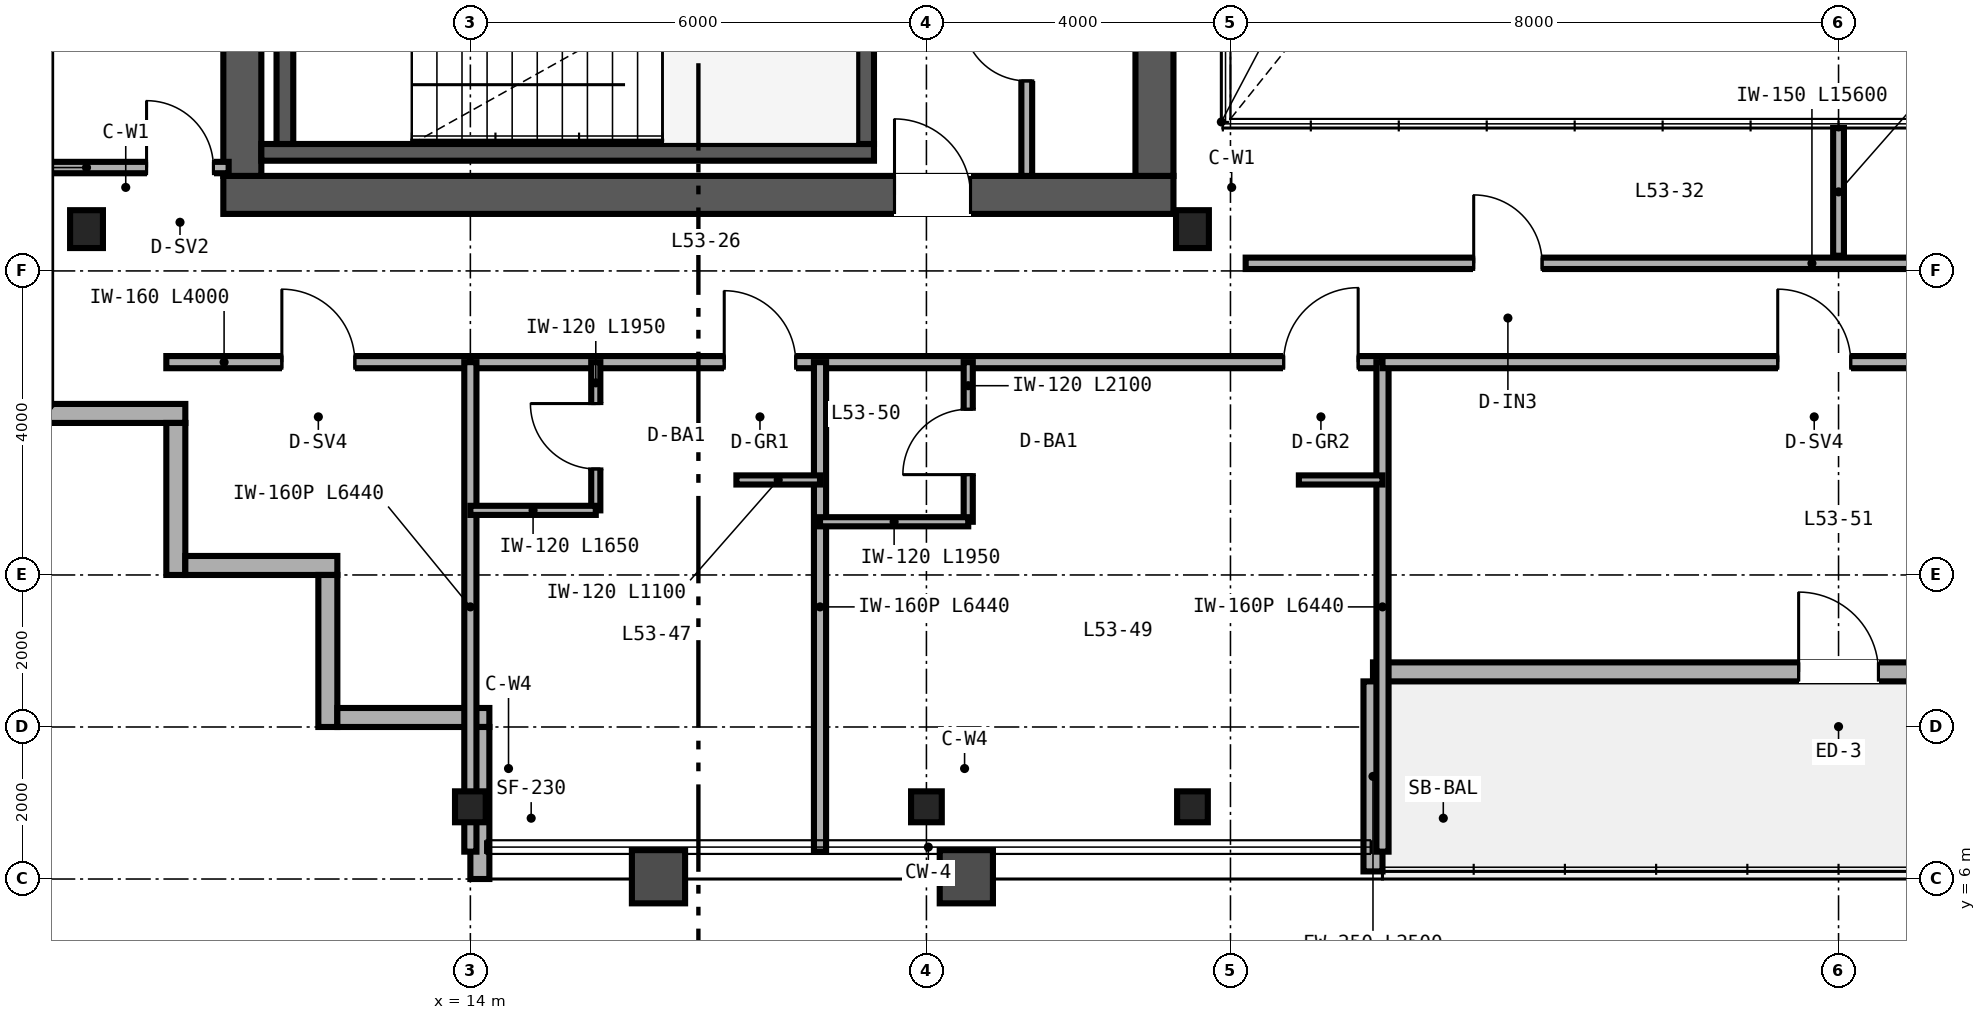
"""IFC4 building model, lengths in metres.
Left out: names, types, materials, properties, quantities, classifications, styles, units other than length and angle.
Written with IfcOpenShell. Run it as: python <this file> out.ifc"""

import sys

from ifc_helpers import new_model, si_unit, direction, frame, frame_2d, origin, origin_2d, place, context, subcontext, project, spatial, rectangle, i_section, extrude, source, transform, mapped, element, fill, save


model = new_model("IFC4")
c1 = context("Model", 3, precision=1e-05, world=origin(), true_north=direction((0.0, 1.0)))
c2 = subcontext(c1, "Body", "Model", "MODEL_VIEW")
j1 = project(units=[si_unit("LENGTHUNIT", "METRE"), si_unit("PLANEANGLEUNIT", "RADIAN")], contexts=[c1])
p1 = place(None, origin())
s1 = spatial("IfcSite", under=j1, at=p1, CompositionType="ELEMENT")
p2 = place(p1, origin())
s2 = spatial("IfcBuilding", under=s1, at=p2, CompositionType="ELEMENT")
p3 = place(p2, frame((0.0, 0.0, 210.0)))
s3 = spatial("IfcBuildingStorey", under=s2, at=p3, CompositionType="ELEMENT", Elevation=210.0)
p4 = place(p3, frame((10.75, 15.0, 0.0), z_axis=(0.0, 0.0, 1.0), x_axis=(1.0, 0.0, 0.0)))
e1 = element("IfcWall", 1, at=p4, inside=s3, PredefinedType="SHEAR", context=c2, shape_type="SweptSolid", body=[
    extrude(rectangle(XDim=12.5, YDim=0.5, at=frame_2d((6.25, 0.0))), origin(), (0.0, 0.0, 1.0), 3.37),
])
p5 = place(p4, frame((8.83, 0.0, 0.0)))
e2 = element("IfcOpeningElement", 2, at=p5, cuts=e1, PredefinedType="OPENING", context=c2, shape_type="SweptSolid", body=[
    extrude(rectangle(XDim=1.0, YDim=2.15, at=frame_2d((0.5, 1.075))), frame((0.0, 0.26, 0.0), z_axis=(0.0, -1.0, 0.0), x_axis=(1.0, 0.0, 0.0)), (0.0, 0.0, 1.0), 0.52),
])
for number, where, z_axis, x_axis in (
    (3, (11.0, 15.25, 0.0), (0.0, 0.0, 1.0), (0.0, 1.0, 0.0)),
    (4, (23.0, 15.25, 0.0), (0.0, 0.0, 1.0), (0.0, 1.0, 0.0)),
):
    element("IfcWall", number, at=place(p3, frame(where, z_axis=z_axis, x_axis=x_axis)), inside=s3, PredefinedType="SHEAR", context=c2, shape_type="SweptSolid", body=[
        extrude(rectangle(XDim=21.5, YDim=0.5, at=frame_2d((10.75, 0.0))), origin(), (0.0, 0.0, 1.0), 3.37),
    ])
p6 = place(p3, frame((11.25, 15.56, 0.0), z_axis=(0.0, 0.0, 1.0), x_axis=(1.0, 0.0, 0.0)))
e5 = element("IfcWall", 5, at=p6, inside=s3, PredefinedType="SHEAR", context=c2, shape_type="SweptSolid", body=[
    extrude(rectangle(XDim=8.06, YDim=0.22, at=frame_2d((4.03, 0.0))), origin(), (0.0, 0.0, 1.0), 3.4),
])
for number, where, z_axis, x_axis in (
    (6, (11.56, 15.67, 0.0), (0.0, 0.0, 1.0), (0.0, 1.0, 0.0)),
    (7, (19.2, 15.67, 0.0), (0.0, 0.0, 1.0), (0.0, 1.0, 0.0)),
):
    element("IfcWall", number, at=place(p3, frame(where, z_axis=z_axis, x_axis=x_axis)), inside=s3, PredefinedType="SHEAR", context=c2, shape_type="SweptSolid", body=[
        extrude(rectangle(XDim=3.28, YDim=0.22, at=frame_2d((1.64, 0.0))), origin(), (0.0, 0.0, 1.0), 3.4),
    ])
m1 = source(origin(), c2, "Body", "SweptSolid", [
    extrude(i_section(OverallWidth=0.432, OverallDepth=0.498, WebThickness=0.056, FlangeThickness=0.089, FilletRadius=0.025, at=origin_2d()), origin(), (0.0, 0.0, 1.0), 3.37),
])
for number, where, z_axis, x_axis in (
    (8, (8.95, 14.55, 0.0), (0.0, 0.0, 1.0), (1.0, 0.0, 0.0)),
    (9, (23.5, 14.55, 0.0), (0.0, 0.0, 1.0), (1.0, 0.0, 0.0)),
):
    element("IfcColumn", number, at=place(p3, frame(where, z_axis=z_axis, x_axis=x_axis)), inside=s3, PredefinedType="COLUMN", context=c2, shape_type="MappedRepresentation", body=[
        mapped(m1, transform((0.0, 0.0, 0.0), scale=1.0)),
    ])
m2 = source(origin(), c2, "Body", "SweptSolid", [
    extrude(i_section(OverallWidth=0.404, OverallDepth=0.407, WebThickness=0.027, FlangeThickness=0.044, FilletRadius=0.025, at=origin_2d()), origin(), (0.0, 0.0, 1.0), 3.37),
])
for number, where, z_axis, x_axis in (
    (10, (14.0, 6.95, 0.0), (0.0, 0.0, 1.0), (1.0, 0.0, 0.0)),
    (11, (20.0, 6.95, 0.0), (0.0, 0.0, 1.0), (1.0, 0.0, 0.0)),
    (12, (23.5, 6.95, 0.0), (0.0, 0.0, 1.0), (1.0, 0.0, 0.0)),
):
    element("IfcColumn", number, at=place(p3, frame(where, z_axis=z_axis, x_axis=x_axis)), inside=s3, PredefinedType="COLUMN", context=c2, shape_type="MappedRepresentation", body=[
        mapped(m2, transform((0.0, 0.0, 0.0), scale=1.0)),
    ])
p7 = place(p3, frame((8.0, 12.125, 0.0), z_axis=(0.0, 0.0, 1.0), x_axis=(1.0, 0.0, 0.0)))
e13 = element("IfcWall", 13, at=p7, inside=s3, PredefinedType="SOLIDWALL", context=c2, shape_type="SweptSolid", body=[
    extrude(rectangle(XDim=2.25, YDim=0.25, at=frame_2d((1.125, 0.0))), origin(), (0.0, 0.0, 1.0), 3.37),
])
for number, where, z_axis, x_axis in (
    (14, (10.125, 12.0, 0.0), (0.0, 0.0, 1.0), (0.0, -1.0, 0.0)),
    (15, (10.25, 10.125, 0.0), (0.0, 0.0, 1.0), (1.0, 0.0, 0.0)),
    (16, (12.125, 10.0, 0.0), (0.0, 0.0, 1.0), (0.0, -1.0, 0.0)),
    (17, (12.25, 8.125, 0.0), (0.0, 0.0, 1.0), (1.0, 0.0, 0.0)),
):
    element("IfcWall", number, at=place(p3, frame(where, z_axis=z_axis, x_axis=x_axis)), inside=s3, PredefinedType="SOLIDWALL", context=c2, shape_type="SweptSolid", body=[
        extrude(rectangle(XDim=2.0, YDim=0.25, at=frame_2d((1.0, 0.0))), origin(), (0.0, 0.0, 1.0), 3.37),
    ])
p8 = place(p3, frame((14.125, 8.0, 0.0), z_axis=(0.0, 0.0, 1.0), x_axis=(0.0, -1.0, 0.0)))
e18 = element("IfcWall", 18, at=p8, inside=s3, PredefinedType="SOLIDWALL", context=c2, shape_type="SweptSolid", body=[
    extrude(rectangle(XDim=2.0, YDim=0.25, at=frame_2d((1.0, 0.0))), origin(), (0.0, 0.0, 1.0), 2.677),
])
p9 = place(p3, frame((25.875, 8.725, 0.0), z_axis=(0.0, 0.0, 1.0), x_axis=(1.0, 0.0, 0.0)))
e19 = element("IfcWall", 19, at=p9, inside=s3, PredefinedType="SOLIDWALL", context=c2, shape_type="SweptSolid", body=[
    extrude(rectangle(XDim=12.25, YDim=0.25, at=frame_2d((6.125, 0.0))), origin(), (0.0, 0.0, 1.0), 3.37),
])
p10 = place(p9, frame((5.6, 0.0, 0.0)))
e20 = element("IfcOpeningElement", 20, at=p10, cuts=e19, PredefinedType="OPENING", context=c2, shape_type="SweptSolid", body=[
    extrude(rectangle(XDim=1.05, YDim=2.15, at=frame_2d((0.525, 1.075))), frame((0.0, 0.135, 0.0), z_axis=(0.0, -1.0, 0.0), x_axis=(1.0, 0.0, 0.0)), (0.0, 0.0, 1.0), 0.27),
])
p11 = place(p3, frame((25.875, 6.1, 0.0), z_axis=(0.0, 0.0, 1.0), x_axis=(0.0, 1.0, 0.0)))
e21 = element("IfcWall", 21, at=p11, inside=s3, PredefinedType="SOLIDWALL", context=c2, shape_type="SweptSolid", body=[
    extrude(rectangle(XDim=2.5, YDim=0.25, at=frame_2d((1.25, 0.0))), origin(), (0.0, 0.0, 1.0), 2.443),
])
p12 = place(p3, frame((21.32, 15.25, 0.0), z_axis=(0.0, 0.0, 1.0), x_axis=(0.0, 1.0, 0.0)))
e22 = element("IfcWall", 22, at=p12, inside=s3, PredefinedType="PARTITIONING", context=c2, shape_type="SweptSolid", body=[
    extrude(rectangle(XDim=3.59, YDim=0.142, at=frame_2d((1.795, 0.0))), origin(), (0.0, 0.0, 1.0), 3.37),
])
p13 = place(p12, frame((1.25, 0.0, 0.0)))
e23 = element("IfcOpeningElement", 23, at=p13, cuts=e22, PredefinedType="OPENING", context=c2, shape_type="SweptSolid", body=[
    extrude(rectangle(XDim=0.84, YDim=2.1, at=frame_2d((0.42, 1.05))), frame((0.0, 0.081, 0.0), z_axis=(0.0, -1.0, 0.0), x_axis=(1.0, 0.0, 0.0)), (0.0, 0.0, 1.0), 0.162),
])
p14 = place(p3, frame((24.2, 14.1, 0.0), z_axis=(0.0, 0.0, 1.0), x_axis=(1.0, 0.0, 0.0)))
e24 = element("IfcWall", 24, at=p14, inside=s3, PredefinedType="PARTITIONING", context=c2, shape_type="SweptSolid", body=[
    extrude(rectangle(XDim=15.6, YDim=0.15, at=frame_2d((7.8, 0.0))), origin(), (0.0, 0.0, 1.0), 3.37),
])
p15 = place(p14, frame((3.0, 0.0, 0.0)))
e25 = element("IfcOpeningElement", 25, at=p15, cuts=e24, PredefinedType="OPENING", context=c2, shape_type="SweptSolid", body=[
    extrude(rectangle(XDim=0.9, YDim=2.15, at=frame_2d((0.45, 1.075))), frame((0.0, 0.085, 0.0), z_axis=(0.0, -1.0, 0.0), x_axis=(1.0, 0.0, 0.0)), (0.0, 0.0, 1.0), 0.17),
])
p16 = place(p14, frame((11.0, 0.0, 0.0)))
e26 = element("IfcOpeningElement", 26, at=p16, cuts=e24, PredefinedType="OPENING", context=c2, shape_type="SweptSolid", body=[
    extrude(rectangle(XDim=0.9, YDim=2.15, at=frame_2d((0.45, 1.075))), frame((0.0, 0.085, 0.0), z_axis=(0.0, -1.0, 0.0), x_axis=(1.0, 0.0, 0.0)), (0.0, 0.0, 1.0), 0.17),
])
p17 = place(p3, frame((32.0, 14.2, 0.0), z_axis=(0.0, 0.0, 1.0), x_axis=(0.0, 1.0, 0.0)))
e27 = element("IfcWall", 27, at=p17, inside=s3, PredefinedType="PARTITIONING", context=c2, shape_type="SweptSolid", body=[
    extrude(rectangle(XDim=1.68, YDim=0.142, at=frame_2d((0.84, 0.0))), origin(), (0.0, 0.0, 1.0), 3.37),
])
p18 = place(p3, frame((8.16, 15.36, 0.0), z_axis=(0.0, 0.0, 1.0), x_axis=(1.0, 0.0, 0.0)))
e28 = element("IfcWall", 28, at=p18, inside=s3, PredefinedType="PARTITIONING", context=c2, shape_type="SweptSolid", body=[
    extrude(rectangle(XDim=2.66, YDim=0.15, at=frame_2d((1.33, 0.0))), origin(), (0.0, 0.0, 1.0), 2.591),
])
p19 = place(p18, frame((1.58, 0.0, 0.0)))
e29 = element("IfcOpeningElement", 29, at=p19, cuts=e28, PredefinedType="OPENING", context=c2, shape_type="SweptSolid", body=[
    extrude(rectangle(XDim=0.88, YDim=2.15, at=frame_2d((0.44, 1.075))), frame((0.0, 0.085, 0.0), z_axis=(0.0, -1.0, 0.0), x_axis=(1.0, 0.0, 0.0)), (0.0, 0.0, 1.0), 0.17),
])
p20 = place(p3, frame((10.0, 12.8, 0.0), z_axis=(0.0, 0.0, 1.0), x_axis=(1.0, 0.0, 0.0)))
e30 = element("IfcWall", 30, at=p20, inside=s3, PredefinedType="PARTITIONING", context=c2, shape_type="SweptSolid", body=[
    extrude(rectangle(XDim=4.0, YDim=0.16, at=frame_2d((2.0, 0.0))), origin(), (0.0, 0.0, 1.0), 3.37),
])
p21 = place(p20, frame((1.52, 0.0, 0.0)))
e31 = element("IfcOpeningElement", 31, at=p21, cuts=e30, PredefinedType="OPENING", context=c2, shape_type="SweptSolid", body=[
    extrude(rectangle(XDim=0.96, YDim=2.15, at=frame_2d((0.48, 1.075))), frame((0.0, 0.09, 0.0), z_axis=(0.0, -1.0, 0.0), x_axis=(1.0, 0.0, 0.0)), (0.0, 0.0, 1.0), 0.18),
])
p22 = place(p3, frame((14.0, 12.8, 0.0), z_axis=(0.0, 0.0, 1.0), x_axis=(1.0, 0.0, 0.0)))
e32 = element("IfcWall", 32, at=p22, inside=s3, PredefinedType="PARTITIONING", context=c2, shape_type="SweptSolid", body=[
    extrude(rectangle(XDim=12.0, YDim=0.16, at=frame_2d((6.0, 0.0))), origin(), (0.0, 0.0, 1.0), 2.913),
])
p23 = place(p22, frame((3.34, 0.0, 0.0)))
e33 = element("IfcOpeningElement", 33, at=p23, cuts=e32, PredefinedType="OPENING", context=c2, shape_type="SweptSolid", body=[
    extrude(rectangle(XDim=0.94, YDim=2.15, at=frame_2d((0.47, 1.075))), frame((0.0, 0.09, 0.0), z_axis=(0.0, -1.0, 0.0), x_axis=(1.0, 0.0, 0.0)), (0.0, 0.0, 1.0), 0.18),
])
p24 = place(p22, frame((10.7, 0.0, 0.0)))
e34 = element("IfcOpeningElement", 34, at=p24, cuts=e32, PredefinedType="OPENING", context=c2, shape_type="SweptSolid", body=[
    extrude(rectangle(XDim=0.98, YDim=2.2, at=frame_2d((0.49, 1.1))), frame((0.0, 0.09, 0.0), z_axis=(0.0, -1.0, 0.0), x_axis=(1.0, 0.0, 0.0)), (0.0, 0.0, 1.0), 0.18),
])
p25 = place(p3, frame((14.0, 6.36, 0.0), z_axis=(0.0, 0.0, 1.0), x_axis=(0.0, 1.0, 0.0)))
e35 = element("IfcWall", 35, at=p25, inside=s3, PredefinedType="PARTITIONING", context=c2, shape_type="SweptSolid", body=[
    extrude(rectangle(XDim=6.44, YDim=0.16, at=frame_2d((3.22, 0.0))), origin(), (0.0, 0.0, 1.0), 2.677),
])
p26 = place(p3, frame((26.0, 6.36, 0.0), z_axis=(0.0, 0.0, 1.0), x_axis=(0.0, 1.0, 0.0)))
e36 = element("IfcWall", 36, at=p26, inside=s3, PredefinedType="PARTITIONING", context=c2, shape_type="SweptSolid", body=[
    extrude(rectangle(XDim=6.44, YDim=0.16, at=frame_2d((3.22, 0.0))), origin(), (0.0, 0.0, 1.0), 2.443),
])
p27 = place(p3, frame((18.6, 6.36, 0.0), z_axis=(0.0, 0.0, 1.0), x_axis=(0.0, 1.0, 0.0)))
e37 = element("IfcWall", 37, at=p27, inside=s3, PredefinedType="PARTITIONING", context=c2, shape_type="SweptSolid", body=[
    extrude(rectangle(XDim=6.44, YDim=0.16, at=frame_2d((3.22, 0.0))), origin(), (0.0, 0.0, 1.0), 2.677),
])
p28 = place(p3, frame((15.65, 10.85, 0.0), z_axis=(0.0, 0.0, 1.0), x_axis=(0.0, 1.0, 0.0)))
e38 = element("IfcWall", 38, at=p28, inside=s3, PredefinedType="PARTITIONING", context=c2, shape_type="SweptSolid", body=[
    extrude(rectangle(XDim=1.95, YDim=0.12, at=frame_2d((0.975, 0.0))), origin(), (0.0, 0.0, 1.0), 3.37),
])
p29 = place(p28, frame((0.545, 0.0, 0.0)))
e39 = element("IfcOpeningElement", 39, at=p29, cuts=e38, PredefinedType="OPENING", context=c2, shape_type="SweptSolid", body=[
    extrude(rectangle(XDim=0.86, YDim=2.1, at=frame_2d((0.43, 1.05))), frame((0.0, 0.07, 0.0), z_axis=(0.0, -1.0, 0.0), x_axis=(1.0, 0.0, 0.0)), (0.0, 0.0, 1.0), 0.14),
])
p30 = place(p3, frame((14.0, 10.85, 0.0), z_axis=(0.0, 0.0, 1.0), x_axis=(1.0, 0.0, 0.0)))
e40 = element("IfcWall", 40, at=p30, inside=s3, PredefinedType="PARTITIONING", context=c2, shape_type="SweptSolid", body=[
    extrude(rectangle(XDim=1.65, YDim=0.12, at=frame_2d((0.825, 0.0))), origin(), (0.0, 0.0, 1.0), 3.37),
])
p31 = place(p3, frame((17.5, 11.25, 0.0), z_axis=(0.0, 0.0, 1.0), x_axis=(1.0, 0.0, 0.0)))
e41 = element("IfcWall", 41, at=p31, inside=s3, PredefinedType="PARTITIONING", context=c2, shape_type="SweptSolid", body=[
    extrude(rectangle(XDim=1.1, YDim=0.12, at=frame_2d((0.55, 0.0))), origin(), (0.0, 0.0, 1.0), 3.37),
])
p32 = place(p3, frame((20.55, 10.7, 0.0), z_axis=(0.0, 0.0, 1.0), x_axis=(0.0, 1.0, 0.0)))
e42 = element("IfcWall", 42, at=p32, inside=s3, PredefinedType="PARTITIONING", context=c2, shape_type="SweptSolid", body=[
    extrude(rectangle(XDim=2.1, YDim=0.12, at=frame_2d((1.05, 0.0))), origin(), (0.0, 0.0, 1.0), 3.37),
])
p33 = place(p32, frame((0.62, 0.0, 0.0)))
e43 = element("IfcOpeningElement", 43, at=p33, cuts=e42, PredefinedType="OPENING", context=c2, shape_type="SweptSolid", body=[
    extrude(rectangle(XDim=0.86, YDim=2.1, at=frame_2d((0.43, 1.05))), frame((0.0, 0.07, 0.0), z_axis=(0.0, -1.0, 0.0), x_axis=(1.0, 0.0, 0.0)), (0.0, 0.0, 1.0), 0.14),
])
p34 = place(p3, frame((18.6, 10.7, 0.0), z_axis=(0.0, 0.0, 1.0), x_axis=(1.0, 0.0, 0.0)))
e44 = element("IfcWall", 44, at=p34, inside=s3, PredefinedType="PARTITIONING", context=c2, shape_type="SweptSolid", body=[
    extrude(rectangle(XDim=1.95, YDim=0.12, at=frame_2d((0.975, 0.0))), origin(), (0.0, 0.0, 1.0), 3.37),
])
p35 = place(p3, frame((24.9, 11.25, 0.0), z_axis=(0.0, 0.0, 1.0), x_axis=(1.0, 0.0, 0.0)))
e45 = element("IfcWall", 45, at=p35, inside=s3, PredefinedType="PARTITIONING", context=c2, shape_type="SweptSolid", body=[
    extrude(rectangle(XDim=1.1, YDim=0.12, at=frame_2d((0.55, 0.0))), origin(), (0.0, 0.0, 1.0), 3.37),
])
p36 = place(p3, frame((26.0, 12.8, 0.0), z_axis=(0.0, 0.0, 1.0), x_axis=(1.0, 0.0, 0.0)))
e46 = element("IfcWall", 46, at=p36, inside=s3, PredefinedType="PARTITIONING", context=c2, shape_type="SweptSolid", body=[
    extrude(rectangle(XDim=12.0, YDim=0.16, at=frame_2d((6.0, 0.0))), origin(), (0.0, 0.0, 1.0), 3.37),
])
p37 = place(p36, frame((5.2, 0.0, 0.0)))
e47 = element("IfcOpeningElement", 47, at=p37, cuts=e46, PredefinedType="OPENING", context=c2, shape_type="SweptSolid", body=[
    extrude(rectangle(XDim=0.96, YDim=2.15, at=frame_2d((0.48, 1.075))), frame((0.0, 0.09, 0.0), z_axis=(0.0, -1.0, 0.0), x_axis=(1.0, 0.0, 0.0)), (0.0, 0.0, 1.0), 0.18),
])
m3 = source(origin(), c2, "Body", "SweptSolid", [
    extrude(rectangle(XDim=1.05, YDim=2.15, at=frame_2d((0.525, 1.075))), frame((0.0, 0.025, 0.0), z_axis=(0.0, -1.0, 0.0), x_axis=(1.0, 0.0, 0.0)), (0.0, 0.0, 1.0), 0.05),
])
p38 = place(p10, origin())
e48 = element("IfcDoor", 48, at=p38, inside=s3, OperationType="SINGLE_SWING_LEFT", PredefinedType="DOOR", context=c2, shape_type="MappedRepresentation", body=[
    mapped(m3, transform((0.0, 0.0, 0.0), scale=1.0)),
])
fill(e20, e48)
m4 = source(origin(), c2, "Body", "SweptSolid", [
    extrude(rectangle(XDim=0.84, YDim=2.1, at=frame_2d((0.42, 1.05))), frame((0.0, 0.025, 0.0), z_axis=(0.0, -1.0, 0.0), x_axis=(1.0, 0.0, 0.0)), (0.0, 0.0, 1.0), 0.05),
])
p39 = place(p13, origin())
e49 = element("IfcDoor", 49, at=p39, inside=s3, OperationType="SINGLE_SWING_RIGHT", PredefinedType="DOOR", context=c2, shape_type="MappedRepresentation", body=[
    mapped(m4, transform((0.0, 0.0, 0.0), scale=1.0)),
])
fill(e23, e49)
m5 = source(origin(), c2, "Body", "SweptSolid", [
    extrude(rectangle(XDim=1.0, YDim=2.15, at=frame_2d((0.5, 1.075))), frame((0.0, 0.025, 0.0), z_axis=(0.0, -1.0, 0.0), x_axis=(1.0, 0.0, 0.0)), (0.0, 0.0, 1.0), 0.05),
])
p40 = place(p5, origin())
e50 = element("IfcDoor", 50, at=p40, inside=s3, OperationType="SINGLE_SWING_LEFT", PredefinedType="DOOR", context=c2, shape_type="MappedRepresentation", body=[
    mapped(m5, transform((0.0, 0.0, 0.0), scale=1.0)),
])
fill(e2, e50)
m6 = source(origin(), c2, "Body", "SweptSolid", [
    extrude(rectangle(XDim=0.9, YDim=2.15, at=frame_2d((0.45, 1.075))), frame((0.0, 0.025, 0.0), z_axis=(0.0, -1.0, 0.0), x_axis=(1.0, 0.0, 0.0)), (0.0, 0.0, 1.0), 0.05),
])
p41 = place(p15, origin())
e51 = element("IfcDoor", 51, at=p41, inside=s3, OperationType="SINGLE_SWING_LEFT", PredefinedType="DOOR", context=c2, shape_type="MappedRepresentation", body=[
    mapped(m6, transform((0.0, 0.0, 0.0), scale=1.0)),
])
fill(e25, e51)
m7 = source(origin(), c2, "Body", "SweptSolid", [
    extrude(rectangle(XDim=0.88, YDim=2.15, at=frame_2d((0.44, 1.075))), frame((0.0, 0.025, 0.0), z_axis=(0.0, -1.0, 0.0), x_axis=(1.0, 0.0, 0.0)), (0.0, 0.0, 1.0), 0.05),
])
p42 = place(p19, origin())
e52 = element("IfcDoor", 52, at=p42, inside=s3, OperationType="SINGLE_SWING_LEFT", PredefinedType="DOOR", context=c2, shape_type="MappedRepresentation", body=[
    mapped(m7, transform((0.0, 0.0, 0.0), scale=1.0)),
])
fill(e29, e52)
m8 = source(origin(), c2, "Body", "SweptSolid", [
    extrude(rectangle(XDim=0.96, YDim=2.15, at=frame_2d((0.48, 1.075))), frame((0.0, 0.025, 0.0), z_axis=(0.0, -1.0, 0.0), x_axis=(1.0, 0.0, 0.0)), (0.0, 0.0, 1.0), 0.05),
])
p43 = place(p21, origin())
e53 = element("IfcDoor", 53, at=p43, inside=s3, OperationType="SINGLE_SWING_LEFT", PredefinedType="DOOR", context=c2, shape_type="MappedRepresentation", body=[
    mapped(m8, transform((0.0, 0.0, 0.0), scale=1.0)),
])
fill(e31, e53)
m9 = source(origin(), c2, "Body", "SweptSolid", [
    extrude(rectangle(XDim=0.86, YDim=2.1, at=frame_2d((0.43, 1.05))), frame((0.0, 0.025, 0.0), z_axis=(0.0, -1.0, 0.0), x_axis=(1.0, 0.0, 0.0)), (0.0, 0.0, 1.0), 0.05),
])
p44 = place(p29, origin())
e54 = element("IfcDoor", 54, at=p44, inside=s3, OperationType="SINGLE_SWING_RIGHT", PredefinedType="DOOR", context=c2, shape_type="MappedRepresentation", body=[
    mapped(m9, transform((0.0, 0.0, 0.0), scale=1.0)),
])
fill(e39, e54)
p45 = place(p33, origin())
e55 = element("IfcDoor", 55, at=p45, inside=s3, OperationType="SINGLE_SWING_LEFT", PredefinedType="DOOR", context=c2, shape_type="MappedRepresentation", body=[
    mapped(m9, transform((0.0, 0.0, 0.0), scale=1.0)),
])
fill(e43, e55)
m10 = source(origin(), c2, "Body", "SweptSolid", [
    extrude(rectangle(XDim=0.94, YDim=2.15, at=frame_2d((0.47, 1.075))), frame((0.0, 0.025, 0.0), z_axis=(0.0, -1.0, 0.0), x_axis=(1.0, 0.0, 0.0)), (0.0, 0.0, 1.0), 0.05),
])
p46 = place(p23, origin())
e56 = element("IfcDoor", 56, at=p46, inside=s3, OperationType="SINGLE_SWING_LEFT", PredefinedType="DOOR", context=c2, shape_type="MappedRepresentation", body=[
    mapped(m10, transform((0.0, 0.0, 0.0), scale=1.0)),
])
fill(e33, e56)
m11 = source(origin(), c2, "Body", "SweptSolid", [
    extrude(rectangle(XDim=0.98, YDim=2.2, at=frame_2d((0.49, 1.1))), frame((0.0, 0.025, 0.0), z_axis=(0.0, -1.0, 0.0), x_axis=(1.0, 0.0, 0.0)), (0.0, 0.0, 1.0), 0.05),
])
p47 = place(p24, origin())
e57 = element("IfcDoor", 57, at=p47, inside=s3, OperationType="SINGLE_SWING_RIGHT", PredefinedType="DOOR", context=c2, shape_type="MappedRepresentation", body=[
    mapped(m11, transform((0.0, 0.0, 0.0), scale=1.0)),
])
fill(e34, e57)
p48 = place(p37, origin())
e58 = element("IfcDoor", 58, at=p48, inside=s3, OperationType="SINGLE_SWING_LEFT", PredefinedType="DOOR", context=c2, shape_type="MappedRepresentation", body=[
    mapped(m8, transform((0.0, 0.0, 0.0), scale=1.0)),
])
fill(e47, e58)
save(model, sys.argv[1])
